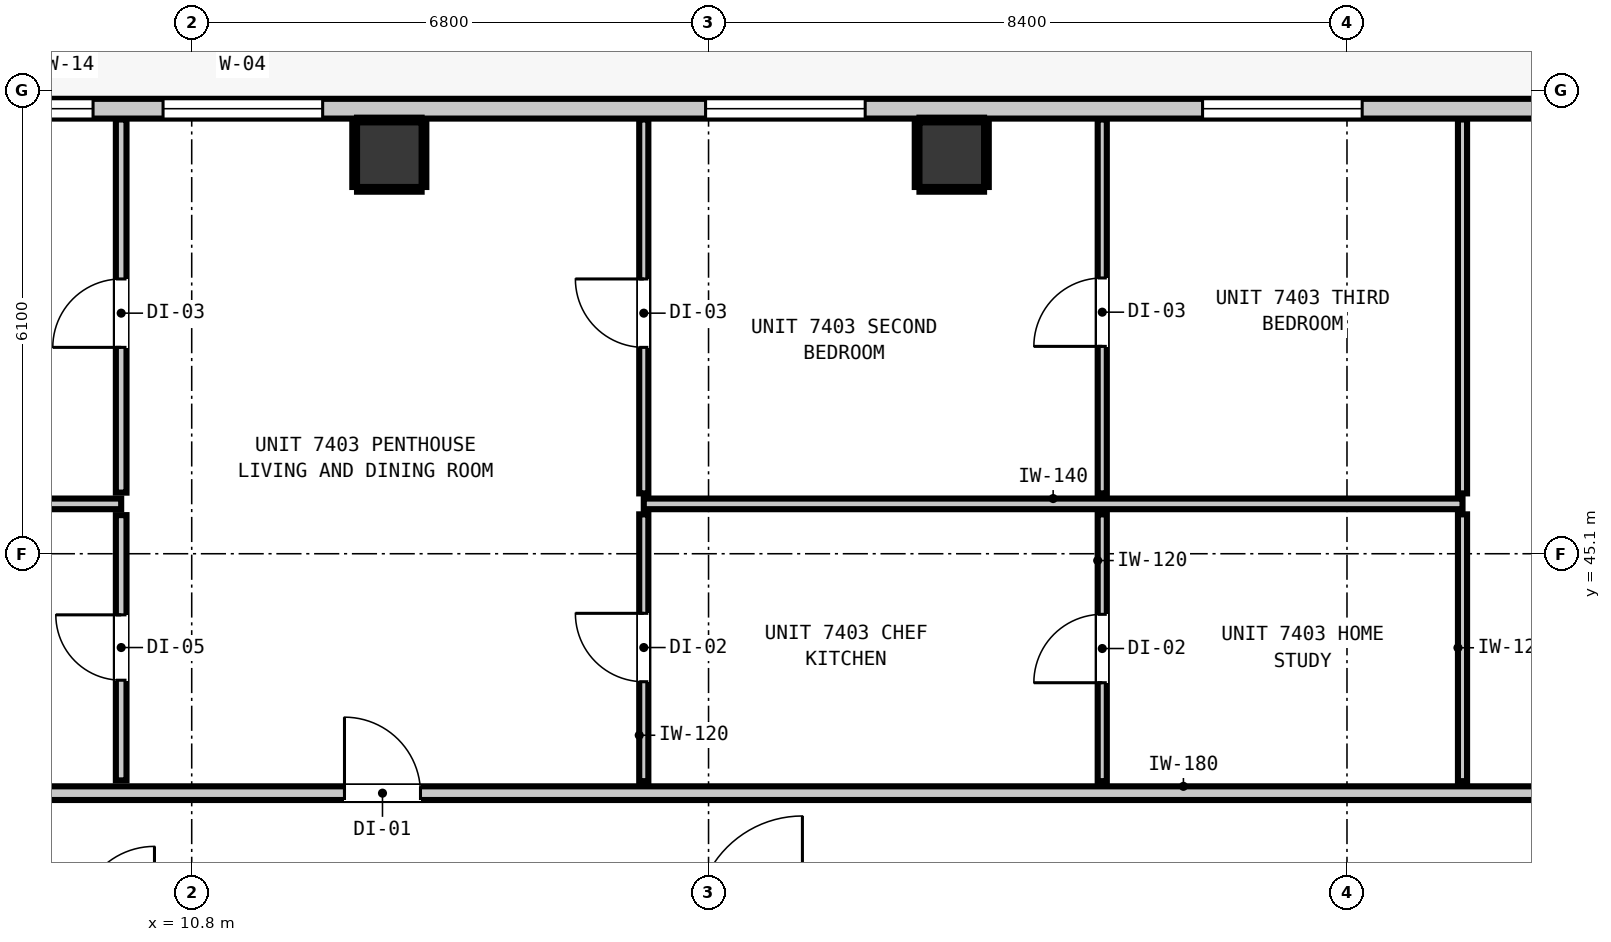
"""IFC4 building model, lengths in metres.
Left out: names, types, materials, properties, quantities, classifications, styles, units other than length and angle.
Written with IfcOpenShell. Run it as: python <this file> out.ifc"""

import sys

from ifc_helpers import new_model, si_unit, direction, frame, frame_2d, origin, origin_2d, place, context, subcontext, project, spatial, rectangle, extrude, element, fill, save


model = new_model("IFC4")
c1 = context("Model", 3, precision=1e-05, world=origin(), true_north=direction((0.0, 1.0)))
c2 = subcontext(c1, "Body", "Model", "MODEL_VIEW")
j1 = project(units=[si_unit("LENGTHUNIT", "METRE"), si_unit("PLANEANGLEUNIT", "RADIAN")], contexts=[c1])
p1 = place(None, origin())
s1 = spatial("IfcSite", under=j1, at=p1, CompositionType="ELEMENT")
p2 = place(p1, origin())
s2 = spatial("IfcBuilding", under=s1, at=p2, CompositionType="ELEMENT")
p3 = place(p2, frame((0.0, 0.0, 254.52)))
s3 = spatial("IfcBuildingStorey", under=s2, at=p3, CompositionType="ELEMENT", Elevation=254.52)
for number, where, z_axis, x_axis in (
    (1, (13.4, 50.35, 0.0), (0.0, 0.0, 1.0), (1.0, 0.0, 0.0)),
    (2, (20.8, 50.35, 0.0), (0.0, 0.0, 1.0), (1.0, 0.0, 0.0)),
):
    element("IfcColumn", number, at=place(p3, frame(where, z_axis=z_axis, x_axis=x_axis)), inside=s3, PredefinedType="COLUMN", context=c2, shape_type="SweptSolid", body=[
        extrude(rectangle(XDim=0.85, YDim=0.85, at=origin_2d()), origin(), (0.0, 0.0, 1.0), 3.32),
    ])
p4 = place(p3, frame((6.545, 50.955, 0.0), z_axis=(0.0, 0.0, 1.0), x_axis=(1.0, 0.0, 0.0)))
e3 = element("IfcWall", 3, at=p4, inside=s3, PredefinedType="STANDARD", context=c2, shape_type="SweptSolid", body=[
    extrude(rectangle(XDim=32.71, YDim=0.26, at=frame_2d((16.355, 0.0))), origin(), (0.0, 0.0, 1.0), 2.96),
])
p5 = place(p4, frame((0.907, 0.0, 0.0)))
e4 = element("IfcOpeningElement", 4, at=p5, cuts=e3, PredefinedType="OPENING", context=c2, shape_type="SweptSolid", body=[
    extrude(rectangle(XDim=1.0, YDim=2.15, at=frame_2d((0.5, 1.075))), frame((0.0, 0.14, 0.0), z_axis=(0.0, -1.0, 0.0), x_axis=(1.0, 0.0, 0.0)), (0.0, 0.0, 1.0), 0.28),
])
p6 = place(p4, frame((3.878, 0.0, 0.85)))
e5 = element("IfcOpeningElement", 5, at=p6, cuts=e3, PredefinedType="OPENING", context=c2, shape_type="SweptSolid", body=[
    extrude(rectangle(XDim=2.1, YDim=1.9, at=frame_2d((1.05, 0.95))), frame((0.0, 0.14, 0.0), z_axis=(0.0, -1.0, 0.0), x_axis=(1.0, 0.0, 0.0)), (0.0, 0.0, 1.0), 0.28),
])
p7 = place(p4, frame((2.377, 0.0, 0.85)))
e6 = element("IfcOpeningElement", 6, at=p7, cuts=e3, PredefinedType="OPENING", context=c2, shape_type="SweptSolid", body=[
    extrude(rectangle(XDim=0.58, YDim=1.5, at=frame_2d((0.29, 0.75))), frame((0.0, 0.14, 0.0), z_axis=(0.0, -1.0, 0.0), x_axis=(1.0, 0.0, 0.0)), (0.0, 0.0, 1.0), 0.28),
])
p8 = place(p4, frame((11.016, 0.0, 0.85)))
e7 = element("IfcOpeningElement", 7, at=p8, cuts=e3, PredefinedType="OPENING", context=c2, shape_type="SweptSolid", body=[
    extrude(rectangle(XDim=2.1, YDim=1.9, at=frame_2d((1.05, 0.95))), frame((0.0, 0.14, 0.0), z_axis=(0.0, -1.0, 0.0), x_axis=(1.0, 0.0, 0.0)), (0.0, 0.0, 1.0), 0.28),
])
p9 = place(p4, frame((17.555, 0.0, 0.85)))
e8 = element("IfcOpeningElement", 8, at=p9, cuts=e3, PredefinedType="OPENING", context=c2, shape_type="SweptSolid", body=[
    extrude(rectangle(XDim=2.1, YDim=1.9, at=frame_2d((1.05, 0.95))), frame((0.0, 0.14, 0.0), z_axis=(0.0, -1.0, 0.0), x_axis=(1.0, 0.0, 0.0)), (0.0, 0.0, 1.0), 0.28),
])
p10 = place(p4, frame((25.255, 0.0, 0.85)))
e9 = element("IfcOpeningElement", 9, at=p10, cuts=e3, PredefinedType="OPENING", context=c2, shape_type="SweptSolid", body=[
    extrude(rectangle(XDim=2.1, YDim=1.9, at=frame_2d((1.05, 0.95))), frame((0.0, 0.14, 0.0), z_axis=(0.0, -1.0, 0.0), x_axis=(1.0, 0.0, 0.0)), (0.0, 0.0, 1.0), 0.28),
])
p11 = place(p3, frame((4.587, 41.95, 0.0), z_axis=(0.0, 0.0, 1.0), x_axis=(1.0, 0.0, 0.0)))
e10 = element("IfcWall", 10, at=p11, inside=s3, PredefinedType="PARTITIONING", context=c2, shape_type="SweptSolid", body=[
    extrude(rectangle(XDim=36.626, YDim=0.18, at=frame_2d((18.313, 0.0))), origin(), (0.0, 0.0, 1.0), 2.96),
])
p12 = place(p11, frame((8.223, 0.0, 0.0)))
e11 = element("IfcOpeningElement", 11, at=p12, cuts=e10, PredefinedType="OPENING", context=c2, shape_type="SweptSolid", body=[
    extrude(rectangle(XDim=1.0, YDim=2.15, at=frame_2d((0.5, 1.075))), frame((0.0, 0.1, 0.0), z_axis=(0.0, -1.0, 0.0), x_axis=(1.0, 0.0, 0.0)), (0.0, 0.0, 1.0), 0.2),
])
p13 = place(p11, frame((29.299, 0.0, 0.0)))
e12 = element("IfcOpeningElement", 12, at=p13, cuts=e10, PredefinedType="OPENING", context=c2, shape_type="SweptSolid", body=[
    extrude(rectangle(XDim=0.9, YDim=2.1, at=frame_2d((0.45, 1.05))), frame((0.0, 0.1, 0.0), z_axis=(0.0, -1.0, 0.0), x_axis=(1.0, 0.0, 0.0)), (0.0, 0.0, 1.0), 0.2),
])
p14 = place(p3, frame((4.587, 45.756, 0.0), z_axis=(0.0, 0.0, 1.0), x_axis=(1.0, 0.0, 0.0)))
e13 = element("IfcWall", 13, at=p14, inside=s3, PredefinedType="PARTITIONING", context=c2, shape_type="SweptSolid", body=[
    extrude(rectangle(XDim=5.285, YDim=0.14, at=frame_2d((2.643, 0.0))), origin(), (0.0, 0.0, 1.0), 2.96),
])
p15 = place(p3, frame((16.748, 45.756, 0.0), z_axis=(0.0, 0.0, 1.0), x_axis=(1.0, 0.0, 0.0)))
e14 = element("IfcWall", 14, at=p15, inside=s3, PredefinedType="PARTITIONING", context=c2, shape_type="SweptSolid", body=[
    extrude(rectangle(XDim=10.772, YDim=0.14, at=frame_2d((5.386, 0.0))), origin(), (0.0, 0.0, 1.0), 2.96),
])
p16 = place(p3, frame((9.872, 42.118, 0.0), z_axis=(0.0, 0.0, 1.0), x_axis=(0.0, 1.0, 0.0)))
e15 = element("IfcWall", 15, at=p16, inside=s3, PredefinedType="PARTITIONING", context=c2, shape_type="SweptSolid", body=[
    extrude(rectangle(XDim=3.49, YDim=0.14, at=frame_2d((1.745, 0.0))), origin(), (0.0, 0.0, 1.0), 2.96),
])
p17 = place(p16, frame((1.318, 0.0, 0.0)))
e16 = element("IfcOpeningElement", 16, at=p17, cuts=e15, PredefinedType="OPENING", context=c2, shape_type="SweptSolid", body=[
    extrude(rectangle(XDim=0.86, YDim=2.02, at=frame_2d((0.43, 1.01))), frame((0.0, 0.08, 0.0), z_axis=(0.0, -1.0, 0.0), x_axis=(1.0, 0.0, 0.0)), (0.0, 0.0, 1.0), 0.16),
])
p18 = place(p3, frame((9.872, 45.904, 0.0), z_axis=(0.0, 0.0, 1.0), x_axis=(0.0, 1.0, 0.0)))
e17 = element("IfcWall", 17, at=p18, inside=s3, PredefinedType="PARTITIONING", context=c2, shape_type="SweptSolid", body=[
    extrude(rectangle(XDim=4.909, YDim=0.14, at=frame_2d((2.455, 0.0))), origin(), (0.0, 0.0, 1.0), 2.96),
])
p19 = place(p18, frame((1.911, 0.0, 0.0)))
e18 = element("IfcOpeningElement", 18, at=p19, cuts=e17, PredefinedType="OPENING", context=c2, shape_type="SweptSolid", body=[
    extrude(rectangle(XDim=0.9, YDim=2.1, at=frame_2d((0.45, 1.05))), frame((0.0, 0.08, 0.0), z_axis=(0.0, -1.0, 0.0), x_axis=(1.0, 0.0, 0.0)), (0.0, 0.0, 1.0), 0.16),
])
p20 = place(p3, frame((16.748, 42.108, 0.0), z_axis=(0.0, 0.0, 1.0), x_axis=(0.0, 1.0, 0.0)))
e19 = element("IfcWall", 19, at=p20, inside=s3, PredefinedType="PARTITIONING", context=c2, shape_type="SweptSolid", body=[
    extrude(rectangle(XDim=3.51, YDim=0.12, at=frame_2d((1.755, 0.0))), origin(), (0.0, 0.0, 1.0), 2.96),
])
p21 = place(p20, frame((1.308, 0.0, 0.0)))
e20 = element("IfcOpeningElement", 20, at=p21, cuts=e19, PredefinedType="OPENING", context=c2, shape_type="SweptSolid", body=[
    extrude(rectangle(XDim=0.9, YDim=2.1, at=frame_2d((0.45, 1.05))), frame((0.0, 0.07, 0.0), z_axis=(0.0, -1.0, 0.0), x_axis=(1.0, 0.0, 0.0)), (0.0, 0.0, 1.0), 0.14),
])
p22 = place(p3, frame((16.748, 45.894, 0.0), z_axis=(0.0, 0.0, 1.0), x_axis=(0.0, 1.0, 0.0)))
e21 = element("IfcWall", 21, at=p22, inside=s3, PredefinedType="PARTITIONING", context=c2, shape_type="SweptSolid", body=[
    extrude(rectangle(XDim=4.919, YDim=0.12, at=frame_2d((2.459, 0.0))), origin(), (0.0, 0.0, 1.0), 2.96),
])
p23 = place(p22, frame((1.921, 0.0, 0.0)))
e22 = element("IfcOpeningElement", 22, at=p23, cuts=e21, PredefinedType="OPENING", context=c2, shape_type="SweptSolid", body=[
    extrude(rectangle(XDim=0.9, YDim=2.1, at=frame_2d((0.45, 1.05))), frame((0.0, 0.07, 0.0), z_axis=(0.0, -1.0, 0.0), x_axis=(1.0, 0.0, 0.0)), (0.0, 0.0, 1.0), 0.14),
])
p24 = place(p3, frame((22.78, 42.108, 0.0), z_axis=(0.0, 0.0, 1.0), x_axis=(0.0, 1.0, 0.0)))
e23 = element("IfcWall", 23, at=p24, inside=s3, PredefinedType="PARTITIONING", context=c2, shape_type="SweptSolid", body=[
    extrude(rectangle(XDim=3.51, YDim=0.12, at=frame_2d((1.755, 0.0))), origin(), (0.0, 0.0, 1.0), 2.96),
])
p25 = place(p24, frame((1.295, 0.0, 0.0)))
e24 = element("IfcOpeningElement", 24, at=p25, cuts=e23, PredefinedType="OPENING", context=c2, shape_type="SweptSolid", body=[
    extrude(rectangle(XDim=0.9, YDim=2.1, at=frame_2d((0.45, 1.05))), frame((0.0, 0.07, 0.0), z_axis=(0.0, -1.0, 0.0), x_axis=(1.0, 0.0, 0.0)), (0.0, 0.0, 1.0), 0.14),
])
p26 = place(p3, frame((22.78, 45.894, 0.0), z_axis=(0.0, 0.0, 1.0), x_axis=(0.0, 1.0, 0.0)))
e25 = element("IfcWall", 25, at=p26, inside=s3, PredefinedType="PARTITIONING", context=c2, shape_type="SweptSolid", body=[
    extrude(rectangle(XDim=4.919, YDim=0.12, at=frame_2d((2.459, 0.0))), origin(), (0.0, 0.0, 1.0), 2.96),
])
p27 = place(p26, frame((1.934, 0.0, 0.0)))
e26 = element("IfcOpeningElement", 26, at=p27, cuts=e25, PredefinedType="OPENING", context=c2, shape_type="SweptSolid", body=[
    extrude(rectangle(XDim=0.9, YDim=2.1, at=frame_2d((0.45, 1.05))), frame((0.0, 0.07, 0.0), z_axis=(0.0, -1.0, 0.0), x_axis=(1.0, 0.0, 0.0)), (0.0, 0.0, 1.0), 0.14),
])
p28 = place(p3, frame((27.52, 42.108, 0.0), z_axis=(0.0, 0.0, 1.0), x_axis=(0.0, 1.0, 0.0)))
e27 = element("IfcWall", 27, at=p28, inside=s3, PredefinedType="PARTITIONING", context=c2, shape_type="SweptSolid", body=[
    extrude(rectangle(XDim=3.51, YDim=0.12, at=frame_2d((1.755, 0.0))), origin(), (0.0, 0.0, 1.0), 2.96),
])
p29 = place(p3, frame((27.52, 45.894, 0.0), z_axis=(0.0, 0.0, 1.0), x_axis=(0.0, 1.0, 0.0)))
e28 = element("IfcWall", 28, at=p29, inside=s3, PredefinedType="PARTITIONING", context=c2, shape_type="SweptSolid", body=[
    extrude(rectangle(XDim=4.919, YDim=0.12, at=frame_2d((2.459, 0.0))), origin(), (0.0, 0.0, 1.0), 2.96),
])
for number, where, z_axis, x_axis in (
    (29, (12.975, 49.893, 0.0), (0.0, 0.0, 1.0), (1.0, 0.0, 0.0)),
    (30, (12.975, 50.807, 0.0), (0.0, 0.0, 1.0), (1.0, 0.0, 0.0)),
    (31, (12.943, 49.925, 0.0), (0.0, 0.0, 1.0), (0.0, 1.0, 0.0)),
    (32, (13.857, 49.925, 0.0), (0.0, 0.0, 1.0), (0.0, 1.0, 0.0)),
):
    element("IfcWall", number, at=place(p3, frame(where, z_axis=z_axis, x_axis=x_axis)), inside=s3, PredefinedType="PARTITIONING", context=c2, shape_type="SweptSolid", body=[
        extrude(rectangle(XDim=0.85, YDim=0.06, at=frame_2d((0.425, 0.0))), origin(), (0.0, 0.0, 1.0), 1.45),
    ])
for number, where, z_axis, x_axis in (
    (33, (20.375, 49.893, 0.0), (0.0, 0.0, 1.0), (1.0, 0.0, 0.0)),
    (34, (20.375, 50.807, 0.0), (0.0, 0.0, 1.0), (1.0, 0.0, 0.0)),
):
    element("IfcWall", number, at=place(p3, frame(where, z_axis=z_axis, x_axis=x_axis)), inside=s3, PredefinedType="PARTITIONING", context=c2, shape_type="SweptSolid", body=[
        extrude(rectangle(XDim=0.85, YDim=0.06, at=frame_2d((0.425, 0.0))), origin(), (0.0, 0.0, 1.0), 1.45),
    ])
for number, where, z_axis, x_axis in (
    (35, (20.343, 49.925, 0.0), (0.0, 0.0, 1.0), (0.0, 1.0, 0.0)),
    (36, (21.257, 49.925, 0.0), (0.0, 0.0, 1.0), (0.0, 1.0, 0.0)),
):
    element("IfcWall", number, at=place(p3, frame(where, z_axis=z_axis, x_axis=x_axis)), inside=s3, PredefinedType="PARTITIONING", context=c2, shape_type="SweptSolid", body=[
        extrude(rectangle(XDim=0.85, YDim=0.06, at=frame_2d((0.425, 0.0))), origin(), (0.0, 0.0, 1.0), 1.45),
    ])
p30 = place(p6, origin())
e37 = element("IfcWindow", 37, at=p30, inside=s3, PartitioningType="SINGLE_PANEL", PredefinedType="WINDOW", context=c2, shape_type="SweptSolid", body=[
    extrude(rectangle(XDim=2.1, YDim=1.9, at=frame_2d((1.05, 0.95))), frame((0.0, 0.03, 0.0), z_axis=(0.0, -1.0, 0.0), x_axis=(1.0, 0.0, 0.0)), (0.0, 0.0, 1.0), 0.06),
])
fill(e5, e37)
p31 = place(p7, origin())
e38 = element("IfcWindow", 38, at=p31, inside=s3, PartitioningType="SINGLE_PANEL", PredefinedType="WINDOW", context=c2, shape_type="SweptSolid", body=[
    extrude(rectangle(XDim=0.58, YDim=1.5, at=frame_2d((0.29, 0.75))), frame((0.0, 0.03, 0.0), z_axis=(0.0, -1.0, 0.0), x_axis=(1.0, 0.0, 0.0)), (0.0, 0.0, 1.0), 0.06),
])
fill(e6, e38)
p32 = place(p8, origin())
e39 = element("IfcWindow", 39, at=p32, inside=s3, PartitioningType="SINGLE_PANEL", PredefinedType="WINDOW", context=c2, shape_type="SweptSolid", body=[
    extrude(rectangle(XDim=2.1, YDim=1.9, at=frame_2d((1.05, 0.95))), frame((0.0, 0.03, 0.0), z_axis=(0.0, -1.0, 0.0), x_axis=(1.0, 0.0, 0.0)), (0.0, 0.0, 1.0), 0.06),
])
fill(e7, e39)
p33 = place(p9, origin())
e40 = element("IfcWindow", 40, at=p33, inside=s3, PartitioningType="SINGLE_PANEL", PredefinedType="WINDOW", context=c2, shape_type="SweptSolid", body=[
    extrude(rectangle(XDim=2.1, YDim=1.9, at=frame_2d((1.05, 0.95))), frame((0.0, 0.03, 0.0), z_axis=(0.0, -1.0, 0.0), x_axis=(1.0, 0.0, 0.0)), (0.0, 0.0, 1.0), 0.06),
])
fill(e8, e40)
p34 = place(p12, origin())
e41 = element("IfcDoor", 41, at=p34, inside=s3, OperationType="SINGLE_SWING_LEFT", PredefinedType="DOOR", context=c2, shape_type="SweptSolid", body=[
    extrude(rectangle(XDim=1.0, YDim=2.15, at=frame_2d((0.5, 1.075))), frame((0.0, 0.025, 0.0), z_axis=(0.0, -1.0, 0.0), x_axis=(1.0, 0.0, 0.0)), (0.0, 0.0, 1.0), 0.05),
])
fill(e11, e41)
p35 = place(p17, origin())
e42 = element("IfcDoor", 42, at=p35, inside=s3, OperationType="SINGLE_SWING_RIGHT", PredefinedType="DOOR", context=c2, shape_type="SweptSolid", body=[
    extrude(rectangle(XDim=0.86, YDim=2.02, at=frame_2d((0.43, 1.01))), frame((0.0, 0.025, 0.0), z_axis=(0.0, -1.0, 0.0), x_axis=(1.0, 0.0, 0.0)), (0.0, 0.0, 1.0), 0.05),
])
fill(e16, e42)
p36 = place(p19, origin())
e43 = element("IfcDoor", 43, at=p36, inside=s3, OperationType="SINGLE_SWING_LEFT", PredefinedType="DOOR", context=c2, shape_type="SweptSolid", body=[
    extrude(rectangle(XDim=0.9, YDim=2.1, at=frame_2d((0.45, 1.05))), frame((0.0, 0.025, 0.0), z_axis=(0.0, -1.0, 0.0), x_axis=(1.0, 0.0, 0.0)), (0.0, 0.0, 1.0), 0.05),
])
fill(e18, e43)
p37 = place(p21, origin())
e44 = element("IfcDoor", 44, at=p37, inside=s3, OperationType="SINGLE_SWING_RIGHT", PredefinedType="DOOR", context=c2, shape_type="SweptSolid", body=[
    extrude(rectangle(XDim=0.9, YDim=2.1, at=frame_2d((0.45, 1.05))), frame((0.0, 0.025, 0.0), z_axis=(0.0, -1.0, 0.0), x_axis=(1.0, 0.0, 0.0)), (0.0, 0.0, 1.0), 0.05),
])
fill(e20, e44)
p38 = place(p25, origin())
e45 = element("IfcDoor", 45, at=p38, inside=s3, OperationType="SINGLE_SWING_LEFT", PredefinedType="DOOR", context=c2, shape_type="SweptSolid", body=[
    extrude(rectangle(XDim=0.9, YDim=2.1, at=frame_2d((0.45, 1.05))), frame((0.0, 0.025, 0.0), z_axis=(0.0, -1.0, 0.0), x_axis=(1.0, 0.0, 0.0)), (0.0, 0.0, 1.0), 0.05),
])
fill(e24, e45)
p39 = place(p23, origin())
e46 = element("IfcDoor", 46, at=p39, inside=s3, OperationType="SINGLE_SWING_RIGHT", PredefinedType="DOOR", context=c2, shape_type="SweptSolid", body=[
    extrude(rectangle(XDim=0.9, YDim=2.1, at=frame_2d((0.45, 1.05))), frame((0.0, 0.025, 0.0), z_axis=(0.0, -1.0, 0.0), x_axis=(1.0, 0.0, 0.0)), (0.0, 0.0, 1.0), 0.05),
])
fill(e22, e46)
p40 = place(p27, origin())
e47 = element("IfcDoor", 47, at=p40, inside=s3, OperationType="SINGLE_SWING_LEFT", PredefinedType="DOOR", context=c2, shape_type="SweptSolid", body=[
    extrude(rectangle(XDim=0.9, YDim=2.1, at=frame_2d((0.45, 1.05))), frame((0.0, 0.025, 0.0), z_axis=(0.0, -1.0, 0.0), x_axis=(1.0, 0.0, 0.0)), (0.0, 0.0, 1.0), 0.05),
])
fill(e26, e47)
save(model, sys.argv[1])
